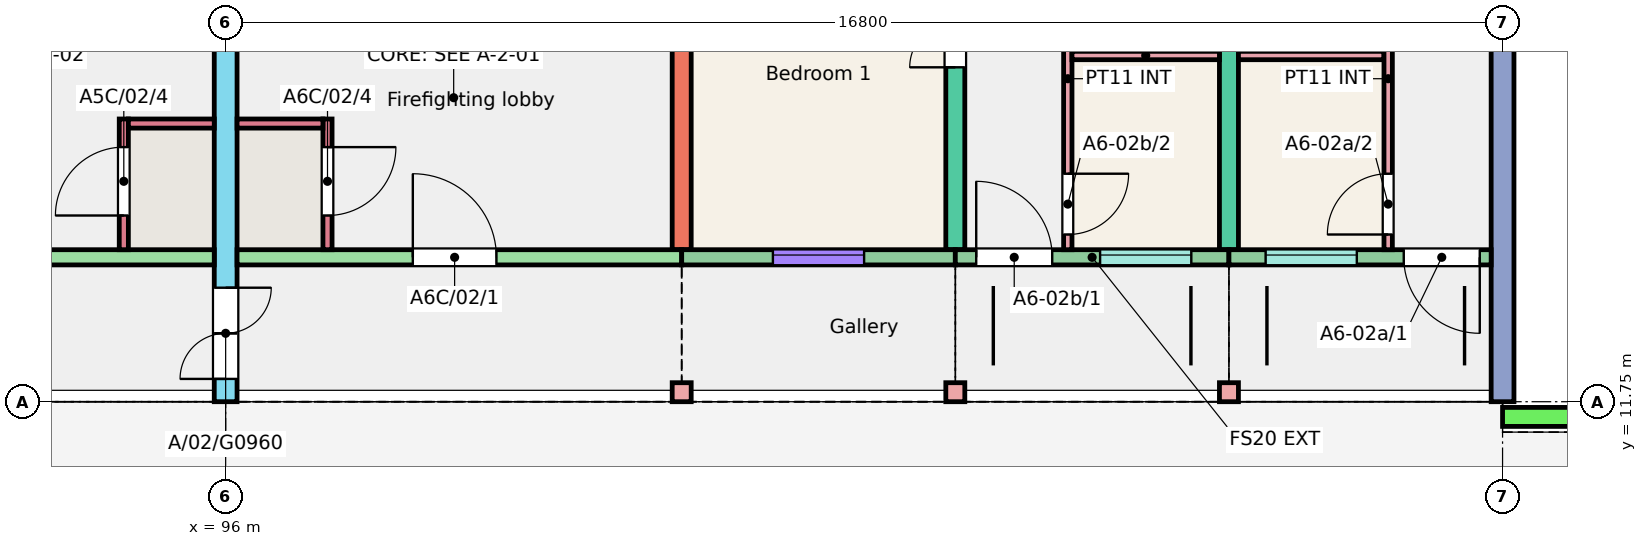
"""IFC4 building model, lengths in metres.
Left out: names, types, materials, properties, quantities, classifications, styles, units other than length and angle.
Written with IfcOpenShell. Run it as: python <this file> out.ifc"""

import sys

from ifc_helpers import new_model, si_unit, direction, frame, frame_2d, origin, origin_2d, place, context, subcontext, project, spatial, rectangle, extrude, element, fill, save


model = new_model("IFC4")
c1 = context("Model", 3, precision=1e-05, world=origin(), true_north=direction((0.0, 1.0)))
c2 = subcontext(c1, "Body", "Model", "MODEL_VIEW")
j1 = project(units=[si_unit("LENGTHUNIT", "METRE"), si_unit("PLANEANGLEUNIT", "RADIAN")], contexts=[c1])
p1 = place(None, origin())
s1 = spatial("IfcSite", under=j1, at=p1, CompositionType="ELEMENT")
p2 = place(p1, origin())
s2 = spatial("IfcBuilding", under=s1, at=p2, CompositionType="ELEMENT")
p3 = place(p2, frame((0.0, 0.0, 6.0)))
s3 = spatial("IfcBuildingStorey", under=s2, at=p3, CompositionType="ELEMENT", Elevation=6.0)
p4 = place(p3, frame((96.0, 11.75, 0.0), z_axis=(0.0, 0.0, 1.0), x_axis=(0.0, 1.0, 0.0)))
e1 = element("IfcWall", 1, at=p4, inside=s3, PredefinedType="SHEAR", context=c2, shape_type="SweptSolid", body=[
    extrude(rectangle(XDim=11.0, YDim=0.3, at=frame_2d((5.5, 0.0))), origin(), (0.0, 0.0, 1.0), 3.0),
])
p5 = place(p4, frame((0.3, 0.0, 0.0)))
e2 = element("IfcOpeningElement", 2, at=p5, cuts=e1, PredefinedType="OPENING", context=c2, shape_type="SweptSolid", body=[
    extrude(rectangle(XDim=1.2, YDim=2.1, at=frame_2d((0.6, 1.05))), frame((0.0, 0.16, 0.0), z_axis=(0.0, -1.0, 0.0), x_axis=(1.0, 0.0, 0.0)), (0.0, 0.0, 1.0), 0.32),
])
p6 = place(p3, frame((102.0, 13.75, 0.0), z_axis=(0.0, 0.0, 1.0), x_axis=(0.0, 1.0, 0.0)))
e3 = element("IfcWall", 3, at=p6, inside=s3, PredefinedType="SHEAR", context=c2, shape_type="SweptSolid", body=[
    extrude(rectangle(XDim=9.0, YDim=0.25, at=frame_2d((4.5, 0.0))), origin(), (0.0, 0.0, 1.0), 3.0),
])
p7 = place(p3, frame((105.6, 13.75, 0.0), z_axis=(0.0, 0.0, 1.0), x_axis=(0.0, 1.0, 0.0)))
e4 = element("IfcWall", 4, at=p7, inside=s3, PredefinedType="SHEAR", context=c2, shape_type="SweptSolid", body=[
    extrude(rectangle(XDim=9.0, YDim=0.25, at=frame_2d((4.5, 0.0))), origin(), (0.0, 0.0, 1.0), 3.0),
])
p8 = place(p7, frame((2.4, 0.0, 0.0)))
e5 = element("IfcOpeningElement", 5, at=p8, cuts=e4, PredefinedType="OPENING", context=c2, shape_type="SweptSolid", body=[
    extrude(rectangle(XDim=1.2, YDim=2.1, at=frame_2d((0.6, 1.05))), frame((0.0, 0.135, 0.0), z_axis=(0.0, -1.0, 0.0), x_axis=(1.0, 0.0, 0.0)), (0.0, 0.0, 1.0), 0.27),
])
p9 = place(p7, frame((6.4, 0.0, 0.0)))
e6 = element("IfcOpeningElement", 6, at=p9, cuts=e4, PredefinedType="OPENING", context=c2, shape_type="SweptSolid", body=[
    extrude(rectangle(XDim=1.2, YDim=2.1, at=frame_2d((0.6, 1.05))), frame((0.0, 0.135, 0.0), z_axis=(0.0, -1.0, 0.0), x_axis=(1.0, 0.0, 0.0)), (0.0, 0.0, 1.0), 0.27),
])
p10 = place(p3, frame((109.2, 13.75, 0.0), z_axis=(0.0, 0.0, 1.0), x_axis=(0.0, 1.0, 0.0)))
e7 = element("IfcWall", 7, at=p10, inside=s3, PredefinedType="SHEAR", context=c2, shape_type="SweptSolid", body=[
    extrude(rectangle(XDim=9.0, YDim=0.25, at=frame_2d((4.5, 0.0))), origin(), (0.0, 0.0, 1.0), 3.0),
])
p11 = place(p3, frame((112.8, 11.75, 0.0), z_axis=(0.0, 0.0, 1.0), x_axis=(0.0, 1.0, 0.0)))
e8 = element("IfcWall", 8, at=p11, inside=s3, PredefinedType="SHEAR", context=c2, shape_type="SweptSolid", body=[
    extrude(rectangle(XDim=11.0, YDim=0.3, at=frame_2d((5.5, 0.0))), origin(), (0.0, 0.0, 1.0), 3.0),
])
p12 = place(p11, frame((7.905, 0.0, 0.9)))
e9 = element("IfcOpeningElement", 9, at=p12, cuts=e8, PredefinedType="OPENING", context=c2, shape_type="SweptSolid", body=[
    extrude(rectangle(XDim=1.8, YDim=1.5, at=frame_2d((0.9, 0.75))), frame((0.0, 0.16, 0.0), z_axis=(0.0, -1.0, 0.0), x_axis=(1.0, 0.0, 0.0)), (0.0, 0.0, 1.0), 0.32),
])
p13 = place(p3, frame((90.0, 13.65, 0.0), z_axis=(0.0, 0.0, 1.0), x_axis=(1.0, 0.0, 0.0)))
e10 = element("IfcWall", 10, at=p13, inside=s3, PredefinedType="SHEAR", context=c2, shape_type="SweptSolid", body=[
    extrude(rectangle(XDim=5.85, YDim=0.2, at=frame_2d((2.925, 0.0))), origin(), (0.0, 0.0, 1.0), 3.0),
])
p14 = place(p13, frame((2.438, 0.0, 0.0)))
e11 = element("IfcOpeningElement", 11, at=p14, cuts=e10, PredefinedType="OPENING", context=c2, shape_type="SweptSolid", body=[
    extrude(rectangle(XDim=1.1, YDim=2.1, at=frame_2d((0.55, 1.05))), frame((0.0, 0.11, 0.0), z_axis=(0.0, -1.0, 0.0), x_axis=(1.0, 0.0, 0.0)), (0.0, 0.0, 1.0), 0.22),
])
p15 = place(p3, frame((94.66, 13.75, 0.0), z_axis=(0.0, 0.0, 1.0), x_axis=(0.0, 1.0, 0.0)))
e12 = element("IfcWall", 12, at=p15, inside=s3, PredefinedType="SHEAR", context=c2, shape_type="SweptSolid", body=[
    extrude(rectangle(XDim=1.72, YDim=0.12, at=frame_2d((0.86, 0.0))), origin(), (0.0, 0.0, 1.0), 3.0),
])
p16 = place(p15, frame((0.45, 0.0, 0.0)))
e13 = element("IfcOpeningElement", 13, at=p16, cuts=e12, PredefinedType="OPENING", context=c2, shape_type="SweptSolid", body=[
    extrude(rectangle(XDim=0.9, YDim=2.1, at=frame_2d((0.45, 1.05))), frame((0.0, 0.07, 0.0), z_axis=(0.0, -1.0, 0.0), x_axis=(1.0, 0.0, 0.0)), (0.0, 0.0, 1.0), 0.14),
])
p17 = place(p3, frame((94.72, 15.41, 0.0), z_axis=(0.0, 0.0, 1.0), x_axis=(1.0, 0.0, 0.0)))
e14 = element("IfcWall", 14, at=p17, inside=s3, PredefinedType="SHEAR", context=c2, shape_type="SweptSolid", body=[
    extrude(rectangle(XDim=1.13, YDim=0.12, at=frame_2d((0.565, 0.0))), origin(), (0.0, 0.0, 1.0), 3.0),
])
p18 = place(p3, frame((96.15, 13.65, 0.0), z_axis=(0.0, 0.0, 1.0), x_axis=(1.0, 0.0, 0.0)))
e15 = element("IfcWall", 15, at=p18, inside=s3, PredefinedType="SHEAR", context=c2, shape_type="SweptSolid", body=[
    extrude(rectangle(XDim=5.85, YDim=0.2, at=frame_2d((2.925, 0.0))), origin(), (0.0, 0.0, 1.0), 3.0),
])
p19 = place(p18, frame((2.312, 0.0, 0.0)))
e16 = element("IfcOpeningElement", 16, at=p19, cuts=e15, PredefinedType="OPENING", context=c2, shape_type="SweptSolid", body=[
    extrude(rectangle(XDim=1.1, YDim=2.1, at=frame_2d((0.55, 1.05))), frame((0.0, 0.11, 0.0), z_axis=(0.0, -1.0, 0.0), x_axis=(1.0, 0.0, 0.0)), (0.0, 0.0, 1.0), 0.22),
])
p20 = place(p3, frame((97.34, 13.75, 0.0), z_axis=(0.0, 0.0, 1.0), x_axis=(0.0, 1.0, 0.0)))
e17 = element("IfcWall", 17, at=p20, inside=s3, PredefinedType="SHEAR", context=c2, shape_type="SweptSolid", body=[
    extrude(rectangle(XDim=1.72, YDim=0.12, at=frame_2d((0.86, 0.0))), origin(), (0.0, 0.0, 1.0), 3.0),
])
p21 = place(p20, frame((0.45, 0.0, 0.0)))
e18 = element("IfcOpeningElement", 18, at=p21, cuts=e17, PredefinedType="OPENING", context=c2, shape_type="SweptSolid", body=[
    extrude(rectangle(XDim=0.9, YDim=2.1, at=frame_2d((0.45, 1.05))), frame((0.0, 0.07, 0.0), z_axis=(0.0, -1.0, 0.0), x_axis=(1.0, 0.0, 0.0)), (0.0, 0.0, 1.0), 0.14),
])
p22 = place(p3, frame((96.15, 15.41, 0.0), z_axis=(0.0, 0.0, 1.0), x_axis=(1.0, 0.0, 0.0)))
e19 = element("IfcWall", 19, at=p22, inside=s3, PredefinedType="SHEAR", context=c2, shape_type="SweptSolid", body=[
    extrude(rectangle(XDim=1.13, YDim=0.12, at=frame_2d((0.565, 0.0))), origin(), (0.0, 0.0, 1.0), 3.0),
])
p23 = place(p3, frame((102.0, 13.65, 0.0), z_axis=(0.0, 0.0, 1.0), x_axis=(1.0, 0.0, 0.0)))
e20 = element("IfcWall", 20, at=p23, inside=s3, PredefinedType="SOLIDWALL", context=c2, shape_type="SweptSolid", body=[
    extrude(rectangle(XDim=3.6, YDim=0.2, at=frame_2d((1.8, 0.0))), origin(), (0.0, 0.0, 1.0), 3.0),
])
p24 = place(p23, frame((1.2, 0.0, 0.8)))
e21 = element("IfcOpeningElement", 21, at=p24, cuts=e20, PredefinedType="OPENING", context=c2, shape_type="SweptSolid", body=[
    extrude(rectangle(XDim=1.2, YDim=1.6, at=frame_2d((0.6, 0.8))), frame((0.0, 0.11, 0.0), z_axis=(0.0, -1.0, 0.0), x_axis=(1.0, 0.0, 0.0)), (0.0, 0.0, 1.0), 0.22),
])
p25 = place(p3, frame((105.6, 13.65, 0.0), z_axis=(0.0, 0.0, 1.0), x_axis=(1.0, 0.0, 0.0)))
e22 = element("IfcWall", 22, at=p25, inside=s3, PredefinedType="SOLIDWALL", context=c2, shape_type="SweptSolid", body=[
    extrude(rectangle(XDim=3.6, YDim=0.2, at=frame_2d((1.8, 0.0))), origin(), (0.0, 0.0, 1.0), 3.0),
])
p26 = place(p25, frame((1.905, 0.0, 1.1)))
e23 = element("IfcOpeningElement", 23, at=p26, cuts=e22, PredefinedType="OPENING", context=c2, shape_type="SweptSolid", body=[
    extrude(rectangle(XDim=1.2, YDim=1.3, at=frame_2d((0.6, 0.65))), frame((0.0, 0.11, 0.0), z_axis=(0.0, -1.0, 0.0), x_axis=(1.0, 0.0, 0.0)), (0.0, 0.0, 1.0), 0.22),
])
p27 = place(p25, frame((0.275, 0.0, 0.0)))
e24 = element("IfcOpeningElement", 24, at=p27, cuts=e22, PredefinedType="OPENING", context=c2, shape_type="SweptSolid", body=[
    extrude(rectangle(XDim=1.0, YDim=2.1, at=frame_2d((0.5, 1.05))), frame((0.0, 0.11, 0.0), z_axis=(0.0, -1.0, 0.0), x_axis=(1.0, 0.0, 0.0)), (0.0, 0.0, 1.0), 0.22),
])
p28 = place(p3, frame((109.2, 13.65, 0.0), z_axis=(0.0, 0.0, 1.0), x_axis=(1.0, 0.0, 0.0)))
e25 = element("IfcWall", 25, at=p28, inside=s3, PredefinedType="SOLIDWALL", context=c2, shape_type="SweptSolid", body=[
    extrude(rectangle(XDim=3.45, YDim=0.2, at=frame_2d((1.725, 0.0))), origin(), (0.0, 0.0, 1.0), 3.0),
])
p29 = place(p28, frame((0.482, 0.0, 1.1)))
e26 = element("IfcOpeningElement", 26, at=p29, cuts=e25, PredefinedType="OPENING", context=c2, shape_type="SweptSolid", body=[
    extrude(rectangle(XDim=1.2, YDim=1.3, at=frame_2d((0.6, 0.65))), frame((0.0, 0.11, 0.0), z_axis=(0.0, -1.0, 0.0), x_axis=(1.0, 0.0, 0.0)), (0.0, 0.0, 1.0), 0.22),
])
p30 = place(p28, frame((2.3, 0.0, 0.0)))
e27 = element("IfcOpeningElement", 27, at=p30, cuts=e25, PredefinedType="OPENING", context=c2, shape_type="SweptSolid", body=[
    extrude(rectangle(XDim=1.0, YDim=2.1, at=frame_2d((0.5, 1.05))), frame((0.0, 0.11, 0.0), z_axis=(0.0, -1.0, 0.0), x_axis=(1.0, 0.0, 0.0)), (0.0, 0.0, 1.0), 0.22),
])
for number, where, z_axis, x_axis in (
    (28, (102.0, 11.875, 0.0), (0.0, 0.0, 1.0), (1.0, 0.0, 0.0)),
    (29, (105.6, 11.875, 0.0), (0.0, 0.0, 1.0), (1.0, 0.0, 0.0)),
    (30, (109.2, 11.875, 0.0), (0.0, 0.0, 1.0), (1.0, 0.0, 0.0)),
):
    element("IfcColumn", number, at=place(p3, frame(where, z_axis=z_axis, x_axis=x_axis)), inside=s3, PredefinedType="COLUMN", context=c2, shape_type="SweptSolid", body=[
        extrude(rectangle(XDim=0.25, YDim=0.25, at=origin_2d()), origin(), (0.0, 0.0, 1.0), 3.0),
    ])
p31 = place(p3, frame((112.8, 11.55, 0.0), z_axis=(0.0, 0.0, 1.0), x_axis=(1.0, 0.0, 0.0)))
e31 = element("IfcWall", 31, at=p31, inside=s3, PredefinedType="PARAPET", context=c2, shape_type="SweptSolid", body=[
    extrude(rectangle(XDim=14.0, YDim=0.25, at=frame_2d((7.0, 0.0))), origin(), (0.0, 0.0, 1.0), 1.1),
])
p32 = place(p3, frame((109.325, 16.305, 0.0), z_axis=(0.0, 0.0, 1.0), x_axis=(1.0, 0.0, 0.0)))
e32 = element("IfcWall", 32, at=p32, inside=s3, PredefinedType="PARTITIONING", context=c2, shape_type="SweptSolid", body=[
    extrude(rectangle(XDim=1.915, YDim=0.11, at=frame_2d((0.958, 0.0))), origin(), (0.0, 0.0, 1.0), 2.8),
])
p33 = place(p3, frame((111.295, 13.75, 0.0), z_axis=(0.0, 0.0, 1.0), x_axis=(0.0, 1.0, 0.0)))
e33 = element("IfcWall", 33, at=p33, inside=s3, PredefinedType="PARTITIONING", context=c2, shape_type="SweptSolid", body=[
    extrude(rectangle(XDim=4.5, YDim=0.11, at=frame_2d((2.25, 0.0))), origin(), (0.0, 0.0, 1.0), 2.8),
])
p34 = place(p33, frame((0.2, 0.0, 0.0)))
e34 = element("IfcOpeningElement", 34, at=p34, cuts=e33, PredefinedType="OPENING", context=c2, shape_type="SweptSolid", body=[
    extrude(rectangle(XDim=0.8, YDim=2.1, at=frame_2d((0.4, 1.05))), frame((0.0, 0.065, 0.0), z_axis=(0.0, -1.0, 0.0), x_axis=(1.0, 0.0, 0.0)), (0.0, 0.0, 1.0), 0.13),
])
p35 = place(p33, frame((3.55, 0.0, 0.0)))
e35 = element("IfcOpeningElement", 35, at=p35, cuts=e33, PredefinedType="OPENING", context=c2, shape_type="SweptSolid", body=[
    extrude(rectangle(XDim=0.8, YDim=2.1, at=frame_2d((0.4, 1.05))), frame((0.0, 0.065, 0.0), z_axis=(0.0, -1.0, 0.0), x_axis=(1.0, 0.0, 0.0)), (0.0, 0.0, 1.0), 0.13),
])
p36 = place(p3, frame((107.08, 13.75, 0.0), z_axis=(0.0, 0.0, 1.0), x_axis=(0.0, 1.0, 0.0)))
e36 = element("IfcWall", 36, at=p36, inside=s3, PredefinedType="PARTITIONING", context=c2, shape_type="SweptSolid", body=[
    extrude(rectangle(XDim=4.5, YDim=0.11, at=frame_2d((2.25, 0.0))), origin(), (0.0, 0.0, 1.0), 2.8),
])
p37 = place(p36, frame((0.2, 0.0, 0.0)))
e37 = element("IfcOpeningElement", 37, at=p37, cuts=e36, PredefinedType="OPENING", context=c2, shape_type="SweptSolid", body=[
    extrude(rectangle(XDim=0.8, YDim=2.1, at=frame_2d((0.4, 1.05))), frame((0.0, 0.065, 0.0), z_axis=(0.0, -1.0, 0.0), x_axis=(1.0, 0.0, 0.0)), (0.0, 0.0, 1.0), 0.13),
])
p38 = place(p36, frame((3.55, 0.0, 0.0)))
e38 = element("IfcOpeningElement", 38, at=p38, cuts=e36, PredefinedType="OPENING", context=c2, shape_type="SweptSolid", body=[
    extrude(rectangle(XDim=0.8, YDim=2.1, at=frame_2d((0.4, 1.05))), frame((0.0, 0.065, 0.0), z_axis=(0.0, -1.0, 0.0), x_axis=(1.0, 0.0, 0.0)), (0.0, 0.0, 1.0), 0.13),
])
p39 = place(p3, frame((107.135, 16.305, 0.0), z_axis=(0.0, 0.0, 1.0), x_axis=(1.0, 0.0, 0.0)))
e39 = element("IfcWall", 39, at=p39, inside=s3, PredefinedType="PARTITIONING", context=c2, shape_type="SweptSolid", body=[
    extrude(rectangle(XDim=1.94, YDim=0.11, at=frame_2d((0.97, 0.0))), origin(), (0.0, 0.0, 1.0), 2.8),
])
p40 = place(p29, origin())
e40 = element("IfcWindow", 40, at=p40, inside=s3, PartitioningType="SINGLE_PANEL", PredefinedType="WINDOW", context=c2, shape_type="SweptSolid", body=[
    extrude(rectangle(XDim=1.2, YDim=1.3, at=frame_2d((0.6, 0.65))), frame((0.0, 0.06, 0.0), z_axis=(0.0, -1.0, 0.0), x_axis=(1.0, 0.0, 0.0)), (0.0, 0.0, 1.0), 0.06),
])
fill(e26, e40)
p41 = place(p24, origin())
e41 = element("IfcWindow", 41, at=p41, inside=s3, PartitioningType="SINGLE_PANEL", PredefinedType="WINDOW", context=c2, shape_type="SweptSolid", body=[
    extrude(rectangle(XDim=1.2, YDim=1.6, at=frame_2d((0.6, 0.8))), frame((0.0, 0.06, 0.0), z_axis=(0.0, -1.0, 0.0), x_axis=(1.0, 0.0, 0.0)), (0.0, 0.0, 1.0), 0.06),
])
fill(e21, e41)
p42 = place(p26, origin())
e42 = element("IfcWindow", 42, at=p42, inside=s3, PartitioningType="SINGLE_PANEL", PredefinedType="WINDOW", context=c2, shape_type="SweptSolid", body=[
    extrude(rectangle(XDim=1.2, YDim=1.3, at=frame_2d((0.6, 0.65))), frame((0.0, 0.06, 0.0), z_axis=(0.0, -1.0, 0.0), x_axis=(1.0, 0.0, 0.0)), (0.0, 0.0, 1.0), 0.06),
])
fill(e23, e42)
p43 = place(p30, origin())
e43 = element("IfcDoor", 43, at=p43, inside=s3, OperationType="SINGLE_SWING_RIGHT", PredefinedType="DOOR", context=c2, shape_type="SweptSolid", body=[
    extrude(rectangle(XDim=1.0, YDim=2.1, at=frame_2d((0.5, 1.05))), frame((0.0, 0.025, 0.0), z_axis=(0.0, -1.0, 0.0), x_axis=(1.0, 0.0, 0.0)), (0.0, 0.0, 1.0), 0.05),
])
fill(e27, e43)
p44 = place(p34, origin())
e44 = element("IfcDoor", 44, at=p44, inside=s3, OperationType="SINGLE_SWING_LEFT", PredefinedType="DOOR", context=c2, shape_type="SweptSolid", body=[
    extrude(rectangle(XDim=0.8, YDim=2.1, at=frame_2d((0.4, 1.05))), frame((0.0, 0.025, 0.0), z_axis=(0.0, -1.0, 0.0), x_axis=(1.0, 0.0, 0.0)), (0.0, 0.0, 1.0), 0.05),
])
fill(e34, e44)
p45 = place(p27, origin())
e45 = element("IfcDoor", 45, at=p45, inside=s3, OperationType="SINGLE_SWING_LEFT", PredefinedType="DOOR", context=c2, shape_type="SweptSolid", body=[
    extrude(rectangle(XDim=1.0, YDim=2.1, at=frame_2d((0.5, 1.05))), frame((0.0, 0.025, 0.0), z_axis=(0.0, -1.0, 0.0), x_axis=(1.0, 0.0, 0.0)), (0.0, 0.0, 1.0), 0.05),
])
fill(e24, e45)
p46 = place(p37, origin())
e46 = element("IfcDoor", 46, at=p46, inside=s3, OperationType="SINGLE_SWING_RIGHT", PredefinedType="DOOR", context=c2, shape_type="SweptSolid", body=[
    extrude(rectangle(XDim=0.8, YDim=2.1, at=frame_2d((0.4, 1.05))), frame((0.0, 0.025, 0.0), z_axis=(0.0, -1.0, 0.0), x_axis=(1.0, 0.0, 0.0)), (0.0, 0.0, 1.0), 0.05),
])
fill(e37, e46)
p47 = place(p8, origin())
e47 = element("IfcDoor", 47, at=p47, inside=s3, OperationType="DOUBLE_DOOR_SINGLE_SWING", PredefinedType="DOOR", context=c2, shape_type="SweptSolid", body=[
    extrude(rectangle(XDim=1.2, YDim=2.1, at=frame_2d((0.6, 1.05))), frame((0.0, 0.025, 0.0), z_axis=(0.0, -1.0, 0.0), x_axis=(1.0, 0.0, 0.0)), (0.0, 0.0, 1.0), 0.05),
])
fill(e5, e47)
p48 = place(p16, origin())
e48 = element("IfcDoor", 48, at=p48, inside=s3, OperationType="SINGLE_SWING_LEFT", PredefinedType="DOOR", context=c2, shape_type="SweptSolid", body=[
    extrude(rectangle(XDim=0.9, YDim=2.1, at=frame_2d((0.45, 1.05))), frame((0.0, 0.025, 0.0), z_axis=(0.0, -1.0, 0.0), x_axis=(1.0, 0.0, 0.0)), (0.0, 0.0, 1.0), 0.05),
])
fill(e13, e48)
p49 = place(p19, origin())
e49 = element("IfcDoor", 49, at=p49, inside=s3, OperationType="SINGLE_SWING_LEFT", PredefinedType="DOOR", context=c2, shape_type="SweptSolid", body=[
    extrude(rectangle(XDim=1.1, YDim=2.1, at=frame_2d((0.55, 1.05))), frame((0.0, 0.025, 0.0), z_axis=(0.0, -1.0, 0.0), x_axis=(1.0, 0.0, 0.0)), (0.0, 0.0, 1.0), 0.05),
])
fill(e16, e49)
p50 = place(p21, origin())
e50 = element("IfcDoor", 50, at=p50, inside=s3, OperationType="SINGLE_SWING_RIGHT", PredefinedType="DOOR", context=c2, shape_type="SweptSolid", body=[
    extrude(rectangle(XDim=0.9, YDim=2.1, at=frame_2d((0.45, 1.05))), frame((0.0, 0.025, 0.0), z_axis=(0.0, -1.0, 0.0), x_axis=(1.0, 0.0, 0.0)), (0.0, 0.0, 1.0), 0.05),
])
fill(e18, e50)
p51 = place(p5, origin())
e51 = element("IfcDoor", 51, at=p51, inside=s3, OperationType="DOUBLE_DOOR_SINGLE_SWING", PredefinedType="DOOR", context=c2, shape_type="SweptSolid", body=[
    extrude(rectangle(XDim=1.2, YDim=2.1, at=frame_2d((0.6, 1.05))), frame((0.0, 0.025, 0.0), z_axis=(0.0, -1.0, 0.0), x_axis=(1.0, 0.0, 0.0)), (0.0, 0.0, 1.0), 0.05),
])
fill(e2, e51)
save(model, sys.argv[1])
